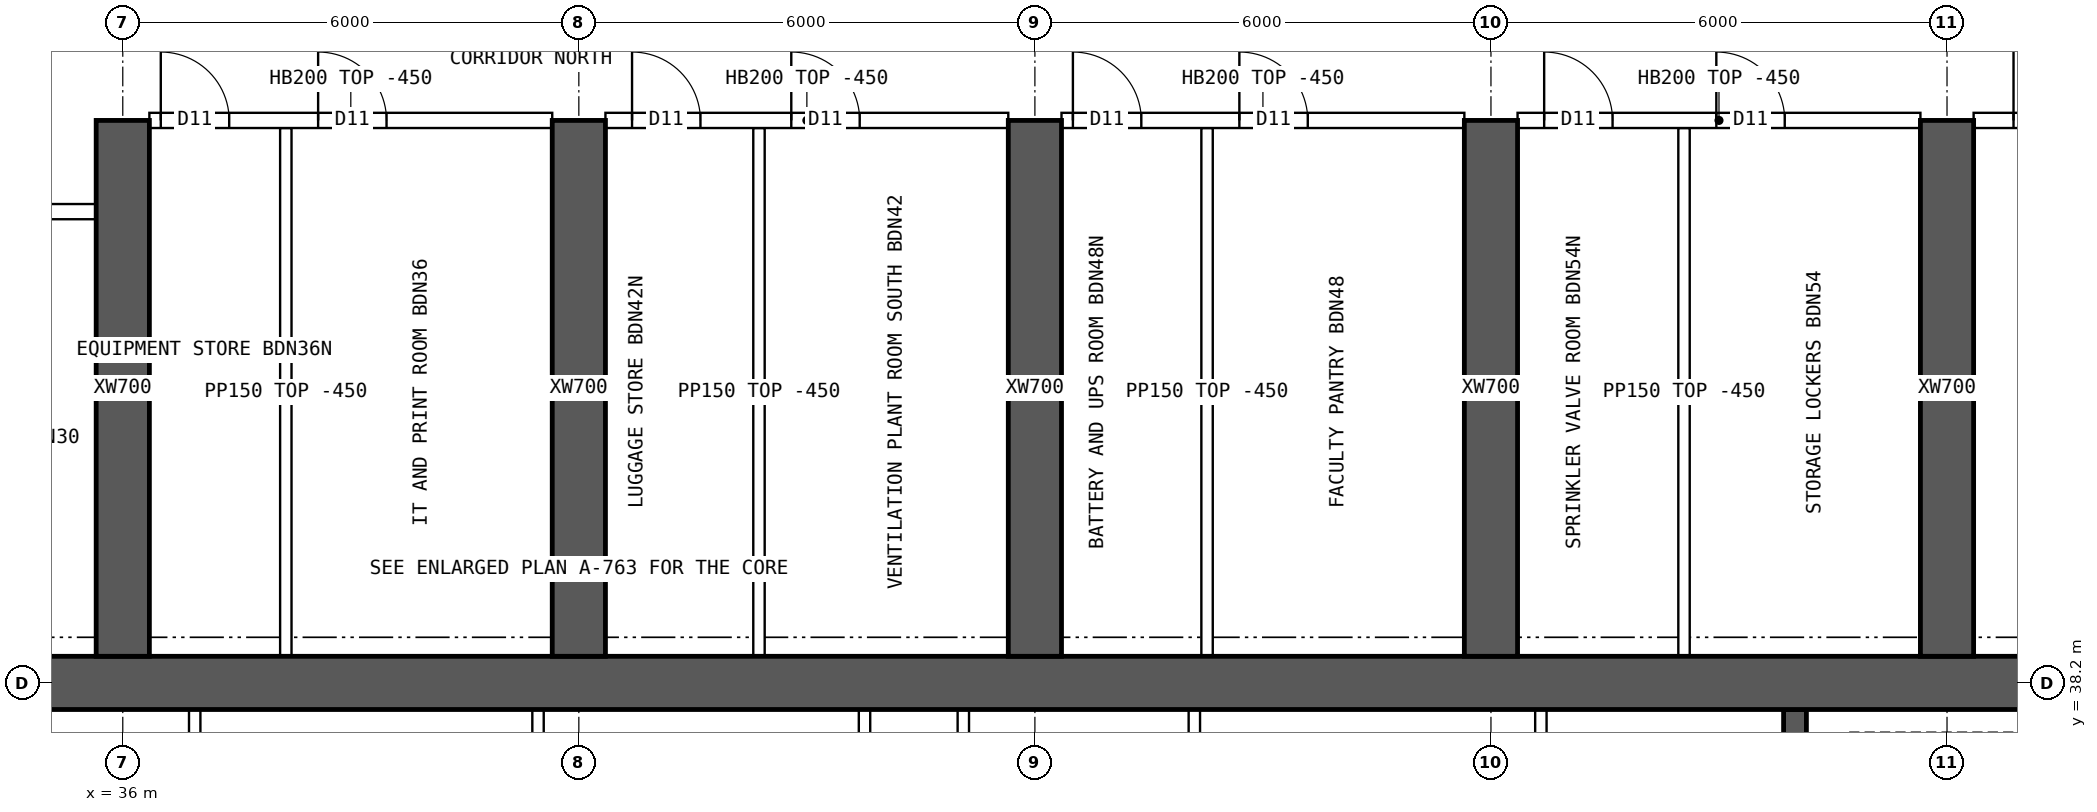
"""IFC4 building model, lengths in metres.
Left out: names, types, materials, properties, quantities, classifications, styles, units other than length and angle.
Written with IfcOpenShell. Run it as: python <this file> out.ifc"""

import sys

from ifc_helpers import new_model, si_unit, direction, frame, frame_2d, origin, place, context, subcontext, project, spatial, rectangle, extrude, element, fill, save


model = new_model("IFC4")
c1 = context("Model", 3, precision=1e-05, world=origin(), true_north=direction((0.0, 1.0)))
c2 = subcontext(c1, "Body", "Model", "MODEL_VIEW")
j1 = project(units=[si_unit("LENGTHUNIT", "METRE"), si_unit("PLANEANGLEUNIT", "RADIAN")], contexts=[c1])
p1 = place(None, origin())
s1 = spatial("IfcSite", under=j1, at=p1, CompositionType="ELEMENT")
p2 = place(p1, origin())
s2 = spatial("IfcBuilding", under=s1, at=p2, CompositionType="ELEMENT")
p3 = place(p2, frame((0.0, 0.0, 242.8)))
s3 = spatial("IfcBuildingStorey", under=s2, at=p3, CompositionType="ELEMENT", Elevation=242.8)
p4 = place(p3, frame((18.0, 38.2, 0.0), z_axis=(0.0, 0.0, 1.0), x_axis=(1.0, 0.0, 0.0)))
e1 = element("IfcWall", 1, at=p4, inside=s3, PredefinedType="SHEAR", context=c2, shape_type="SweptSolid", body=[
    extrude(rectangle(XDim=48.0, YDim=0.7, at=frame_2d((24.0, 0.0))), origin(), (0.0, 0.0, 1.0), 3.75),
])
p5 = place(p3, frame((58.0, 34.75, 0.0), z_axis=(0.0, 0.0, 1.0), x_axis=(0.0, 1.0, 0.0)))
e2 = element("IfcWall", 2, at=p5, inside=s3, PredefinedType="SHEAR", context=c2, shape_type="SweptSolid", body=[
    extrude(rectangle(XDim=3.1, YDim=0.3, at=frame_2d((1.55, 0.0))), origin(), (0.0, 0.0, 1.0), 3.75),
])
for number, where, z_axis, x_axis in (
    (3, (36.0, 38.55, 0.0), (0.0, 0.0, 1.0), (0.0, 1.0, 0.0)),
    (4, (42.0, 38.55, 0.0), (0.0, 0.0, 1.0), (0.0, 1.0, 0.0)),
    (5, (48.0, 38.55, 0.0), (0.0, 0.0, 1.0), (0.0, 1.0, 0.0)),
    (6, (54.0, 38.55, 0.0), (0.0, 0.0, 1.0), (0.0, 1.0, 0.0)),
    (7, (60.0, 38.55, 0.0), (0.0, 0.0, 1.0), (0.0, 1.0, 0.0)),
):
    element("IfcWall", number, at=place(p3, frame(where, z_axis=z_axis, x_axis=x_axis)), inside=s3, PredefinedType="SHEAR", context=c2, shape_type="SweptSolid", body=[
        extrude(rectangle(XDim=7.05, YDim=0.7, at=frame_2d((3.525, 0.0))), origin(), (0.0, 0.0, 1.0), 3.75),
    ])
for number, where, z_axis, x_axis in (
    (8, (36.946, 34.75, 0.0), (0.0, 0.0, 1.0), (0.0, 1.0, 0.0)),
    (9, (41.463, 34.75, 0.0), (0.0, 0.0, 1.0), (0.0, 1.0, 0.0)),
    (10, (45.758, 34.75, 0.0), (0.0, 0.0, 1.0), (0.0, 1.0, 0.0)),
    (11, (47.058, 34.75, 0.0), (0.0, 0.0, 1.0), (0.0, 1.0, 0.0)),
    (12, (50.098, 34.75, 0.0), (0.0, 0.0, 1.0), (0.0, 1.0, 0.0)),
    (13, (54.657, 34.75, 0.0), (0.0, 0.0, 1.0), (0.0, 1.0, 0.0)),
):
    element("IfcWall", number, at=place(p3, frame(where, z_axis=z_axis, x_axis=x_axis)), inside=s3, PredefinedType="SOLIDWALL", context=c2, shape_type="SweptSolid", body=[
        extrude(rectangle(XDim=3.1, YDim=0.15, at=frame_2d((1.55, 0.0))), origin(), (0.0, 0.0, 1.0), 3.3),
    ])
p6 = place(p3, frame((36.35, 45.6, 0.0), z_axis=(0.0, 0.0, 1.0), x_axis=(1.0, 0.0, 0.0)))
e14 = element("IfcWall", 14, at=p6, inside=s3, PredefinedType="SOLIDWALL", context=c2, shape_type="SweptSolid", body=[
    extrude(rectangle(XDim=5.3, YDim=0.2, at=frame_2d((2.65, 0.0))), origin(), (0.0, 0.0, 1.0), 3.3),
])
p7 = place(p6, frame((0.15, 0.0, 0.0)))
e15 = element("IfcOpeningElement", 15, at=p7, cuts=e14, PredefinedType="OPENING", context=c2, shape_type="SweptSolid", body=[
    extrude(rectangle(XDim=0.9, YDim=2.1, at=frame_2d((0.45, 1.05))), frame((0.0, 0.11, 0.0), z_axis=(0.0, -1.0, 0.0), x_axis=(1.0, 0.0, 0.0)), (0.0, 0.0, 1.0), 0.22),
])
p8 = place(p6, frame((2.22, 0.0, 0.0)))
e16 = element("IfcOpeningElement", 16, at=p8, cuts=e14, PredefinedType="OPENING", context=c2, shape_type="SweptSolid", body=[
    extrude(rectangle(XDim=0.9, YDim=2.1, at=frame_2d((0.45, 1.05))), frame((0.0, 0.11, 0.0), z_axis=(0.0, -1.0, 0.0), x_axis=(1.0, 0.0, 0.0)), (0.0, 0.0, 1.0), 0.22),
])
p9 = place(p3, frame((42.35, 45.6, 0.0), z_axis=(0.0, 0.0, 1.0), x_axis=(1.0, 0.0, 0.0)))
e17 = element("IfcWall", 17, at=p9, inside=s3, PredefinedType="SOLIDWALL", context=c2, shape_type="SweptSolid", body=[
    extrude(rectangle(XDim=5.3, YDim=0.2, at=frame_2d((2.65, 0.0))), origin(), (0.0, 0.0, 1.0), 3.3),
])
p10 = place(p9, frame((0.35, 0.0, 0.0)))
e18 = element("IfcOpeningElement", 18, at=p10, cuts=e17, PredefinedType="OPENING", context=c2, shape_type="SweptSolid", body=[
    extrude(rectangle(XDim=0.9, YDim=2.1, at=frame_2d((0.45, 1.05))), frame((0.0, 0.11, 0.0), z_axis=(0.0, -1.0, 0.0), x_axis=(1.0, 0.0, 0.0)), (0.0, 0.0, 1.0), 0.22),
])
p11 = place(p9, frame((2.445, 0.0, 0.0)))
e19 = element("IfcOpeningElement", 19, at=p11, cuts=e17, PredefinedType="OPENING", context=c2, shape_type="SweptSolid", body=[
    extrude(rectangle(XDim=0.9, YDim=2.1, at=frame_2d((0.45, 1.05))), frame((0.0, 0.11, 0.0), z_axis=(0.0, -1.0, 0.0), x_axis=(1.0, 0.0, 0.0)), (0.0, 0.0, 1.0), 0.22),
])
p12 = place(p3, frame((48.35, 45.6, 0.0), z_axis=(0.0, 0.0, 1.0), x_axis=(1.0, 0.0, 0.0)))
e20 = element("IfcWall", 20, at=p12, inside=s3, PredefinedType="SOLIDWALL", context=c2, shape_type="SweptSolid", body=[
    extrude(rectangle(XDim=5.3, YDim=0.2, at=frame_2d((2.65, 0.0))), origin(), (0.0, 0.0, 1.0), 3.3),
])
p13 = place(p12, frame((0.15, 0.0, 0.0)))
e21 = element("IfcOpeningElement", 21, at=p13, cuts=e20, PredefinedType="OPENING", context=c2, shape_type="SweptSolid", body=[
    extrude(rectangle(XDim=0.9, YDim=2.1, at=frame_2d((0.45, 1.05))), frame((0.0, 0.11, 0.0), z_axis=(0.0, -1.0, 0.0), x_axis=(1.0, 0.0, 0.0)), (0.0, 0.0, 1.0), 0.22),
])
p14 = place(p12, frame((2.34, 0.0, 0.0)))
e22 = element("IfcOpeningElement", 22, at=p14, cuts=e20, PredefinedType="OPENING", context=c2, shape_type="SweptSolid", body=[
    extrude(rectangle(XDim=0.9, YDim=2.1, at=frame_2d((0.45, 1.05))), frame((0.0, 0.11, 0.0), z_axis=(0.0, -1.0, 0.0), x_axis=(1.0, 0.0, 0.0)), (0.0, 0.0, 1.0), 0.22),
])
p15 = place(p3, frame((54.35, 45.6, 0.0), z_axis=(0.0, 0.0, 1.0), x_axis=(1.0, 0.0, 0.0)))
e23 = element("IfcWall", 23, at=p15, inside=s3, PredefinedType="SOLIDWALL", context=c2, shape_type="SweptSolid", body=[
    extrude(rectangle(XDim=5.3, YDim=0.2, at=frame_2d((2.65, 0.0))), origin(), (0.0, 0.0, 1.0), 3.3),
])
p16 = place(p15, frame((0.35, 0.0, 0.0)))
e24 = element("IfcOpeningElement", 24, at=p16, cuts=e23, PredefinedType="OPENING", context=c2, shape_type="SweptSolid", body=[
    extrude(rectangle(XDim=0.9, YDim=2.1, at=frame_2d((0.45, 1.05))), frame((0.0, 0.11, 0.0), z_axis=(0.0, -1.0, 0.0), x_axis=(1.0, 0.0, 0.0)), (0.0, 0.0, 1.0), 0.22),
])
p17 = place(p15, frame((2.615, 0.0, 0.0)))
e25 = element("IfcOpeningElement", 25, at=p17, cuts=e23, PredefinedType="OPENING", context=c2, shape_type="SweptSolid", body=[
    extrude(rectangle(XDim=0.9, YDim=2.1, at=frame_2d((0.45, 1.05))), frame((0.0, 0.11, 0.0), z_axis=(0.0, -1.0, 0.0), x_axis=(1.0, 0.0, 0.0)), (0.0, 0.0, 1.0), 0.22),
])
p18 = place(p3, frame((60.35, 45.6, 0.0), z_axis=(0.0, 0.0, 1.0), x_axis=(1.0, 0.0, 0.0)))
e26 = element("IfcWall", 26, at=p18, inside=s3, PredefinedType="SOLIDWALL", context=c2, shape_type="SweptSolid", body=[
    extrude(rectangle(XDim=5.3, YDim=0.2, at=frame_2d((2.65, 0.0))), origin(), (0.0, 0.0, 1.0), 3.3),
])
p19 = place(p18, frame((0.525, 0.0, 0.0)))
e27 = element("IfcOpeningElement", 27, at=p19, cuts=e26, PredefinedType="OPENING", context=c2, shape_type="SweptSolid", body=[
    extrude(rectangle(XDim=1.0, YDim=2.1, at=frame_2d((0.5, 1.05))), frame((0.0, 0.11, 0.0), z_axis=(0.0, -1.0, 0.0), x_axis=(1.0, 0.0, 0.0)), (0.0, 0.0, 1.0), 0.22),
])
p20 = place(p3, frame((30.35, 44.4, 0.0), z_axis=(0.0, 0.0, 1.0), x_axis=(1.0, 0.0, 0.0)))
e28 = element("IfcWall", 28, at=p20, inside=s3, PredefinedType="SOLIDWALL", context=c2, shape_type="SweptSolid", body=[
    extrude(rectangle(XDim=5.3, YDim=0.2, at=frame_2d((2.65, 0.0))), origin(), (0.0, 0.0, 1.0), 3.3),
])
p21 = place(p20, frame((0.8, 0.0, 0.0)))
e29 = element("IfcOpeningElement", 29, at=p21, cuts=e28, PredefinedType="OPENING", context=c2, shape_type="SweptSolid", body=[
    extrude(rectangle(XDim=1.0, YDim=2.1, at=frame_2d((0.5, 1.05))), frame((0.0, 0.11, 0.0), z_axis=(0.0, -1.0, 0.0), x_axis=(1.0, 0.0, 0.0)), (0.0, 0.0, 1.0), 0.22),
])
for number, where, z_axis, x_axis in (
    (30, (38.145, 38.55, 0.0), (0.0, 0.0, 1.0), (0.0, 1.0, 0.0)),
    (31, (44.37, 38.55, 0.0), (0.0, 0.0, 1.0), (0.0, 1.0, 0.0)),
    (32, (50.265, 38.55, 0.0), (0.0, 0.0, 1.0), (0.0, 1.0, 0.0)),
    (33, (56.54, 38.55, 0.0), (0.0, 0.0, 1.0), (0.0, 1.0, 0.0)),
):
    element("IfcWall", number, at=place(p3, frame(where, z_axis=z_axis, x_axis=x_axis)), inside=s3, PredefinedType="PARTITIONING", context=c2, shape_type="SweptSolid", body=[
        extrude(rectangle(XDim=6.95, YDim=0.15, at=frame_2d((3.475, 0.0))), origin(), (0.0, 0.0, 1.0), 3.3),
    ])
p22 = place(p7, origin())
e34 = element("IfcDoor", 34, at=p22, inside=s3, OperationType="SINGLE_SWING_LEFT", PredefinedType="DOOR", context=c2, shape_type="SweptSolid", body=[
    extrude(rectangle(XDim=0.9, YDim=2.1, at=frame_2d((0.45, 1.05))), frame((0.0, 0.025, 0.0), z_axis=(0.0, -1.0, 0.0), x_axis=(1.0, 0.0, 0.0)), (0.0, 0.0, 1.0), 0.05),
])
fill(e15, e34)
p23 = place(p8, origin())
e35 = element("IfcDoor", 35, at=p23, inside=s3, OperationType="SINGLE_SWING_LEFT", PredefinedType="DOOR", context=c2, shape_type="SweptSolid", body=[
    extrude(rectangle(XDim=0.9, YDim=2.1, at=frame_2d((0.45, 1.05))), frame((0.0, 0.025, 0.0), z_axis=(0.0, -1.0, 0.0), x_axis=(1.0, 0.0, 0.0)), (0.0, 0.0, 1.0), 0.05),
])
fill(e16, e35)
p24 = place(p10, origin())
e36 = element("IfcDoor", 36, at=p24, inside=s3, OperationType="SINGLE_SWING_LEFT", PredefinedType="DOOR", context=c2, shape_type="SweptSolid", body=[
    extrude(rectangle(XDim=0.9, YDim=2.1, at=frame_2d((0.45, 1.05))), frame((0.0, 0.025, 0.0), z_axis=(0.0, -1.0, 0.0), x_axis=(1.0, 0.0, 0.0)), (0.0, 0.0, 1.0), 0.05),
])
fill(e18, e36)
p25 = place(p11, origin())
e37 = element("IfcDoor", 37, at=p25, inside=s3, OperationType="SINGLE_SWING_LEFT", PredefinedType="DOOR", context=c2, shape_type="SweptSolid", body=[
    extrude(rectangle(XDim=0.9, YDim=2.1, at=frame_2d((0.45, 1.05))), frame((0.0, 0.025, 0.0), z_axis=(0.0, -1.0, 0.0), x_axis=(1.0, 0.0, 0.0)), (0.0, 0.0, 1.0), 0.05),
])
fill(e19, e37)
p26 = place(p13, origin())
e38 = element("IfcDoor", 38, at=p26, inside=s3, OperationType="SINGLE_SWING_LEFT", PredefinedType="DOOR", context=c2, shape_type="SweptSolid", body=[
    extrude(rectangle(XDim=0.9, YDim=2.1, at=frame_2d((0.45, 1.05))), frame((0.0, 0.025, 0.0), z_axis=(0.0, -1.0, 0.0), x_axis=(1.0, 0.0, 0.0)), (0.0, 0.0, 1.0), 0.05),
])
fill(e21, e38)
p27 = place(p14, origin())
e39 = element("IfcDoor", 39, at=p27, inside=s3, OperationType="SINGLE_SWING_LEFT", PredefinedType="DOOR", context=c2, shape_type="SweptSolid", body=[
    extrude(rectangle(XDim=0.9, YDim=2.1, at=frame_2d((0.45, 1.05))), frame((0.0, 0.025, 0.0), z_axis=(0.0, -1.0, 0.0), x_axis=(1.0, 0.0, 0.0)), (0.0, 0.0, 1.0), 0.05),
])
fill(e22, e39)
p28 = place(p16, origin())
e40 = element("IfcDoor", 40, at=p28, inside=s3, OperationType="SINGLE_SWING_LEFT", PredefinedType="DOOR", context=c2, shape_type="SweptSolid", body=[
    extrude(rectangle(XDim=0.9, YDim=2.1, at=frame_2d((0.45, 1.05))), frame((0.0, 0.025, 0.0), z_axis=(0.0, -1.0, 0.0), x_axis=(1.0, 0.0, 0.0)), (0.0, 0.0, 1.0), 0.05),
])
fill(e24, e40)
p29 = place(p17, origin())
e41 = element("IfcDoor", 41, at=p29, inside=s3, OperationType="SINGLE_SWING_LEFT", PredefinedType="DOOR", context=c2, shape_type="SweptSolid", body=[
    extrude(rectangle(XDim=0.9, YDim=2.1, at=frame_2d((0.45, 1.05))), frame((0.0, 0.025, 0.0), z_axis=(0.0, -1.0, 0.0), x_axis=(1.0, 0.0, 0.0)), (0.0, 0.0, 1.0), 0.05),
])
fill(e25, e41)
p30 = place(p19, origin())
e42 = element("IfcDoor", 42, at=p30, inside=s3, OperationType="SINGLE_SWING_LEFT", PredefinedType="DOOR", context=c2, shape_type="SweptSolid", body=[
    extrude(rectangle(XDim=1.0, YDim=2.1, at=frame_2d((0.5, 1.05))), frame((0.0, 0.025, 0.0), z_axis=(0.0, -1.0, 0.0), x_axis=(1.0, 0.0, 0.0)), (0.0, 0.0, 1.0), 0.05),
])
fill(e27, e42)
save(model, sys.argv[1])
